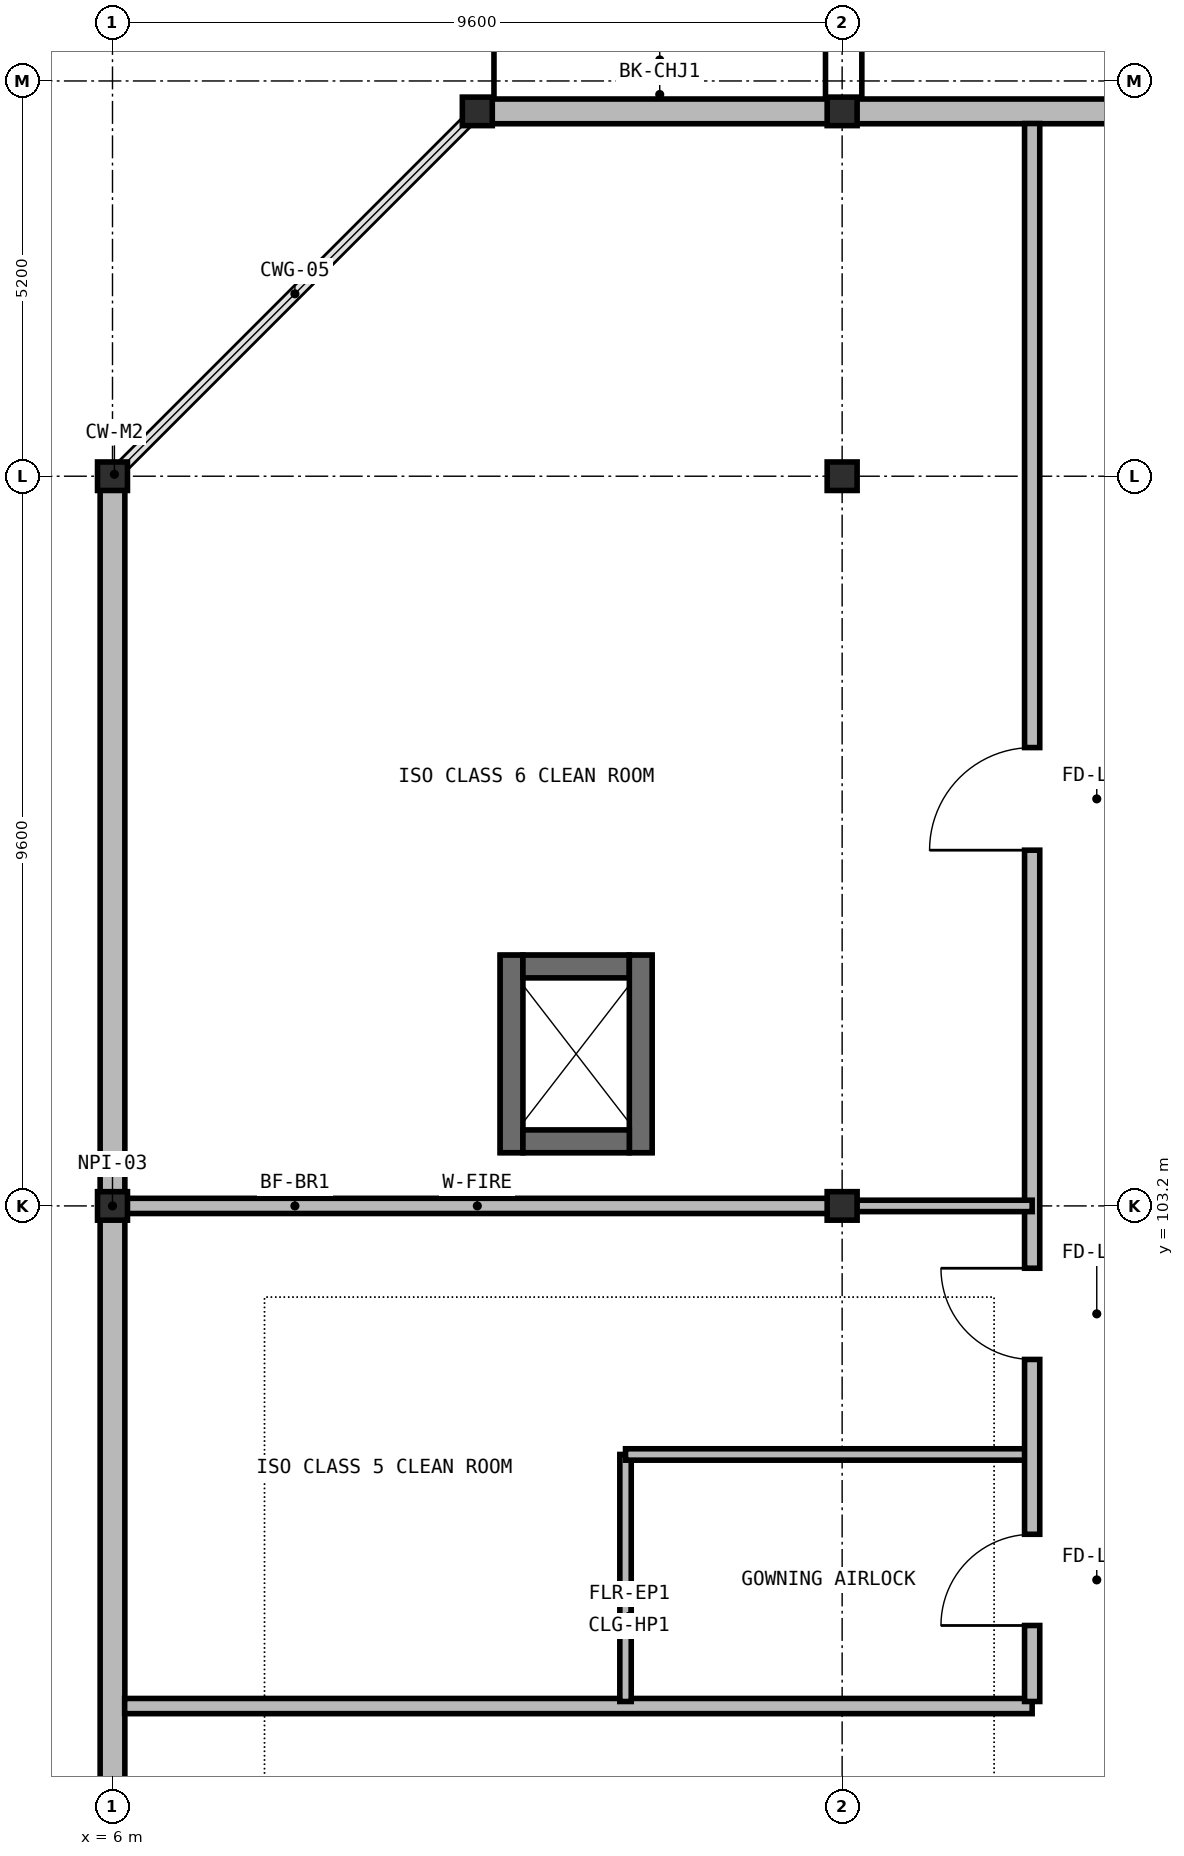
"""IFC4 building model, lengths in metres.
Left out: names, types, materials, properties, quantities, classifications, styles, units other than length and angle.
Written with IfcOpenShell. Run it as: python <this file> out.ifc"""

import sys

from ifc_helpers import new_model, si_unit, direction, frame, frame_2d, origin, origin_2d, place, context, subcontext, project, spatial, rectangle, i_section, extrude, element, fill, save


model = new_model("IFC4")
c1 = context("Model", 3, precision=1e-05, world=origin(), true_north=direction((0.0, 1.0)))
c2 = subcontext(c1, "Body", "Model", "MODEL_VIEW")
j1 = project(units=[si_unit("LENGTHUNIT", "METRE"), si_unit("PLANEANGLEUNIT", "RADIAN")], contexts=[c1])
p1 = place(None, origin())
s1 = spatial("IfcSite", under=j1, at=p1, CompositionType="ELEMENT")
p2 = place(p1, origin())
s2 = spatial("IfcBuilding", under=s1, at=p2, CompositionType="ELEMENT")
p3 = place(p2, frame((0.0, 0.0, 5.25)))
s3 = spatial("IfcBuildingStorey", under=s2, at=p3, CompositionType="ELEMENT", Elevation=5.25)
for number, where, z_axis, x_axis in (
    (1, (6.0, 103.2, 0.0), (0.0, 0.0, 1.0), (1.0, 0.0, 0.0)),
    (2, (6.0, 112.8, 0.0), (0.0, 0.0, 1.0), (1.0, 0.0, 0.0)),
    (3, (15.6, 103.2, 0.0), (0.0, 0.0, 1.0), (1.0, 0.0, 0.0)),
    (4, (15.6, 112.8, 0.0), (0.0, 0.0, 1.0), (1.0, 0.0, 0.0)),
    (5, (15.6, 117.6, 0.0), (0.0, 0.0, 1.0), (1.0, 0.0, 0.0)),
    (6, (10.8, 117.6, 0.0), (0.0, 0.0, 1.0), (1.0, 0.0, 0.0)),
):
    element("IfcColumn", number, at=place(p3, frame(where, z_axis=z_axis, x_axis=x_axis)), inside=s3, PredefinedType="COLUMN", context=c2, shape_type="SweptSolid", body=[
        extrude(i_section(OverallWidth=0.394, OverallDepth=0.375, WebThickness=0.02, FlangeThickness=0.032, at=origin_2d()), origin(), (0.0, 0.0, 1.0), 4.55),
    ])
p4 = place(p3, frame((11.25, 103.9, 0.0), z_axis=(0.0, 0.0, 1.0), x_axis=(0.0, 1.0, 0.0)))
e7 = element("IfcWall", 7, at=p4, inside=s3, PredefinedType="SHEAR", context=c2, shape_type="SweptSolid", body=[
    extrude(rectangle(XDim=2.6, YDim=0.3, at=frame_2d((1.3, 0.0))), origin(), (0.0, 0.0, 1.0), 4.37),
])
p5 = place(p3, frame((11.4, 106.35, 0.0), z_axis=(0.0, 0.0, 1.0), x_axis=(1.0, 0.0, 0.0)))
e8 = element("IfcWall", 8, at=p5, inside=s3, PredefinedType="SHEAR", context=c2, shape_type="SweptSolid", body=[
    extrude(rectangle(XDim=1.4, YDim=0.3, at=frame_2d((0.7, 0.0))), origin(), (0.0, 0.0, 1.0), 4.37),
])
p6 = place(p3, frame((12.95, 106.5, 0.0), z_axis=(0.0, 0.0, 1.0), x_axis=(0.0, -1.0, 0.0)))
e9 = element("IfcWall", 9, at=p6, inside=s3, PredefinedType="SHEAR", context=c2, shape_type="SweptSolid", body=[
    extrude(rectangle(XDim=2.6, YDim=0.3, at=frame_2d((1.3, 0.0))), origin(), (0.0, 0.0, 1.0), 4.37),
])
p7 = place(p3, frame((12.8, 104.05, 0.0), z_axis=(0.0, 0.0, 1.0), x_axis=(-1.0, 0.0, 0.0)))
e10 = element("IfcWall", 10, at=p7, inside=s3, PredefinedType="SHEAR", context=c2, shape_type="SweptSolid", body=[
    extrude(rectangle(XDim=1.4, YDim=0.3, at=frame_2d((0.7, 0.0))), origin(), (0.0, 0.0, 1.0), 4.37),
])
p8 = place(p3, frame((6.0, 93.604, 0.0), z_axis=(0.0, 0.0, 1.0), x_axis=(0.0, 1.0, 0.0)))
e11 = element("IfcWall", 11, at=p8, inside=s3, PredefinedType="SOLIDWALL", context=c2, shape_type="SweptSolid", body=[
    extrude(rectangle(XDim=9.592, YDim=0.325, at=frame_2d((4.796, 0.0))), origin(), (0.0, 0.0, 1.0), 3.884),
])
p9 = place(p3, frame((6.0, 103.204, 0.0), z_axis=(0.0, 0.0, 1.0), x_axis=(0.0, 1.0, 0.0)))
e12 = element("IfcWall", 12, at=p9, inside=s3, PredefinedType="SOLIDWALL", context=c2, shape_type="SweptSolid", body=[
    extrude(rectangle(XDim=9.592, YDim=0.325, at=frame_2d((4.796, 0.0))), origin(), (0.0, 0.0, 1.0), 3.884),
])
p10 = place(p3, frame((10.804, 117.6, 0.0), z_axis=(0.0, 0.0, 1.0), x_axis=(1.0, 0.0, 0.0)))
e13 = element("IfcWall", 13, at=p10, inside=s3, PredefinedType="SOLIDWALL", context=c2, shape_type="SweptSolid", body=[
    extrude(rectangle(XDim=4.792, YDim=0.325, at=frame_2d((2.396, 0.0))), origin(), (0.0, 0.0, 1.0), 4.37),
])
p11 = place(p3, frame((15.604, 117.6, 0.0), z_axis=(0.0, 0.0, 1.0), x_axis=(1.0, 0.0, 0.0)))
e14 = element("IfcWall", 14, at=p11, inside=s3, PredefinedType="SOLIDWALL", context=c2, shape_type="SweptSolid", body=[
    extrude(rectangle(XDim=9.592, YDim=0.325, at=frame_2d((4.796, 0.0))), origin(), (0.0, 0.0, 1.0), 3.884),
])
p12 = place(p3, frame((6.16, 103.2, 0.0), z_axis=(0.0, 0.0, 1.0), x_axis=(1.0, 0.0, 0.0)))
e15 = element("IfcWall", 15, at=p12, inside=s3, PredefinedType="SOLIDWALL", context=c2, shape_type="SweptSolid", body=[
    extrude(rectangle(XDim=9.28, YDim=0.2, at=frame_2d((4.64, 0.0))), origin(), (0.0, 0.0, 1.0), 3.815),
])
p13 = place(p3, frame((6.16, 96.62, 0.0), z_axis=(0.0, 0.0, 1.0), x_axis=(1.0, 0.0, 0.0)))
e16 = element("IfcWall", 16, at=p13, inside=s3, PredefinedType="SOLIDWALL", context=c2, shape_type="SweptSolid", body=[
    extrude(rectangle(XDim=11.94, YDim=0.2, at=frame_2d((5.97, 0.0))), origin(), (0.0, 0.0, 1.0), 4.23),
])
p14 = place(p3, frame((12.75, 96.68, 0.0), z_axis=(0.0, 0.0, 1.0), x_axis=(0.0, 1.0, 0.0)))
e17 = element("IfcWall", 17, at=p14, inside=s3, PredefinedType="PARTITIONING", context=c2, shape_type="SweptSolid", body=[
    extrude(rectangle(XDim=3.25, YDim=0.15, at=frame_2d((1.625, 0.0))), origin(), (0.0, 0.0, 1.0), 4.23),
])
p15 = place(p3, frame((12.75, 99.93, 0.0), z_axis=(0.0, 0.0, 1.0), x_axis=(1.0, 0.0, 0.0)))
e18 = element("IfcWall", 18, at=p15, inside=s3, PredefinedType="PARTITIONING", context=c2, shape_type="SweptSolid", body=[
    extrude(rectangle(XDim=5.35, YDim=0.15, at=frame_2d((2.675, 0.0))), origin(), (0.0, 0.0, 1.0), 4.23),
])
p16 = place(p3, frame((18.1, 96.68, 0.0), z_axis=(0.0, 0.0, 1.0), x_axis=(0.0, 1.0, 0.0)))
e19 = element("IfcWall", 19, at=p16, inside=s3, PredefinedType="SOLIDWALL", context=c2, shape_type="SweptSolid", body=[
    extrude(rectangle(XDim=20.76, YDim=0.2, at=frame_2d((10.38, 0.0))), origin(), (0.0, 0.0, 1.0), 4.23),
])
p17 = place(p16, frame((1.0, 0.0, 0.0)))
e20 = element("IfcOpeningElement", 20, at=p17, cuts=e19, PredefinedType="OPENING", context=c2, shape_type="SweptSolid", body=[
    extrude(rectangle(XDim=1.2, YDim=2.2, at=frame_2d((0.6, 1.1))), frame((0.0, 0.11, 0.0), z_axis=(0.0, -1.0, 0.0), x_axis=(1.0, 0.0, 0.0)), (0.0, 0.0, 1.0), 0.22),
])
p18 = place(p16, frame((4.5, 0.0, 0.0)))
e21 = element("IfcOpeningElement", 21, at=p18, cuts=e19, PredefinedType="OPENING", context=c2, shape_type="SweptSolid", body=[
    extrude(rectangle(XDim=1.2, YDim=2.2, at=frame_2d((0.6, 1.1))), frame((0.0, 0.11, 0.0), z_axis=(0.0, -1.0, 0.0), x_axis=(1.0, 0.0, 0.0)), (0.0, 0.0, 1.0), 0.22),
])
p19 = place(p16, frame((11.2, 0.0, 0.0)))
e22 = element("IfcOpeningElement", 22, at=p19, cuts=e19, PredefinedType="OPENING", context=c2, shape_type="SweptSolid", body=[
    extrude(rectangle(XDim=1.35, YDim=2.2, at=frame_2d((0.675, 1.1))), frame((0.0, 0.11, 0.0), z_axis=(0.0, -1.0, 0.0), x_axis=(1.0, 0.0, 0.0)), (0.0, 0.0, 1.0), 0.22),
])
p20 = place(p3, frame((15.55, 103.2, 0.0), z_axis=(0.0, 0.0, 1.0), x_axis=(1.0, 0.0, 0.0)))
e23 = element("IfcWall", 23, at=p20, inside=s3, PredefinedType="PARTITIONING", context=c2, shape_type="SweptSolid", body=[
    extrude(rectangle(XDim=2.55, YDim=0.15, at=frame_2d((1.275, 0.0))), origin(), (0.0, 0.0, 1.0), 3.815),
])
p21 = place(p17, origin())
e24 = element("IfcDoor", 24, at=p21, inside=s3, OperationType="SINGLE_SWING_LEFT", PredefinedType="DOOR", context=c2, shape_type="SweptSolid", body=[
    extrude(rectangle(XDim=1.2, YDim=2.2, at=frame_2d((0.6, 1.1))), frame((0.0, 0.025, 0.0), z_axis=(0.0, -1.0, 0.0), x_axis=(1.0, 0.0, 0.0)), (0.0, 0.0, 1.0), 0.05),
])
fill(e20, e24)
p22 = place(p18, origin())
e25 = element("IfcDoor", 25, at=p22, inside=s3, OperationType="SINGLE_SWING_RIGHT", PredefinedType="DOOR", context=c2, shape_type="SweptSolid", body=[
    extrude(rectangle(XDim=1.2, YDim=2.2, at=frame_2d((0.6, 1.1))), frame((0.0, 0.025, 0.0), z_axis=(0.0, -1.0, 0.0), x_axis=(1.0, 0.0, 0.0)), (0.0, 0.0, 1.0), 0.05),
])
fill(e21, e25)
p23 = place(p19, origin())
e26 = element("IfcDoor", 26, at=p23, inside=s3, OperationType="SINGLE_SWING_LEFT", PredefinedType="DOOR", context=c2, shape_type="SweptSolid", body=[
    extrude(rectangle(XDim=1.35, YDim=2.2, at=frame_2d((0.675, 1.1))), frame((0.0, 0.025, 0.0), z_axis=(0.0, -1.0, 0.0), x_axis=(1.0, 0.0, 0.0)), (0.0, 0.0, 1.0), 0.05),
])
fill(e22, e26)
save(model, sys.argv[1])
